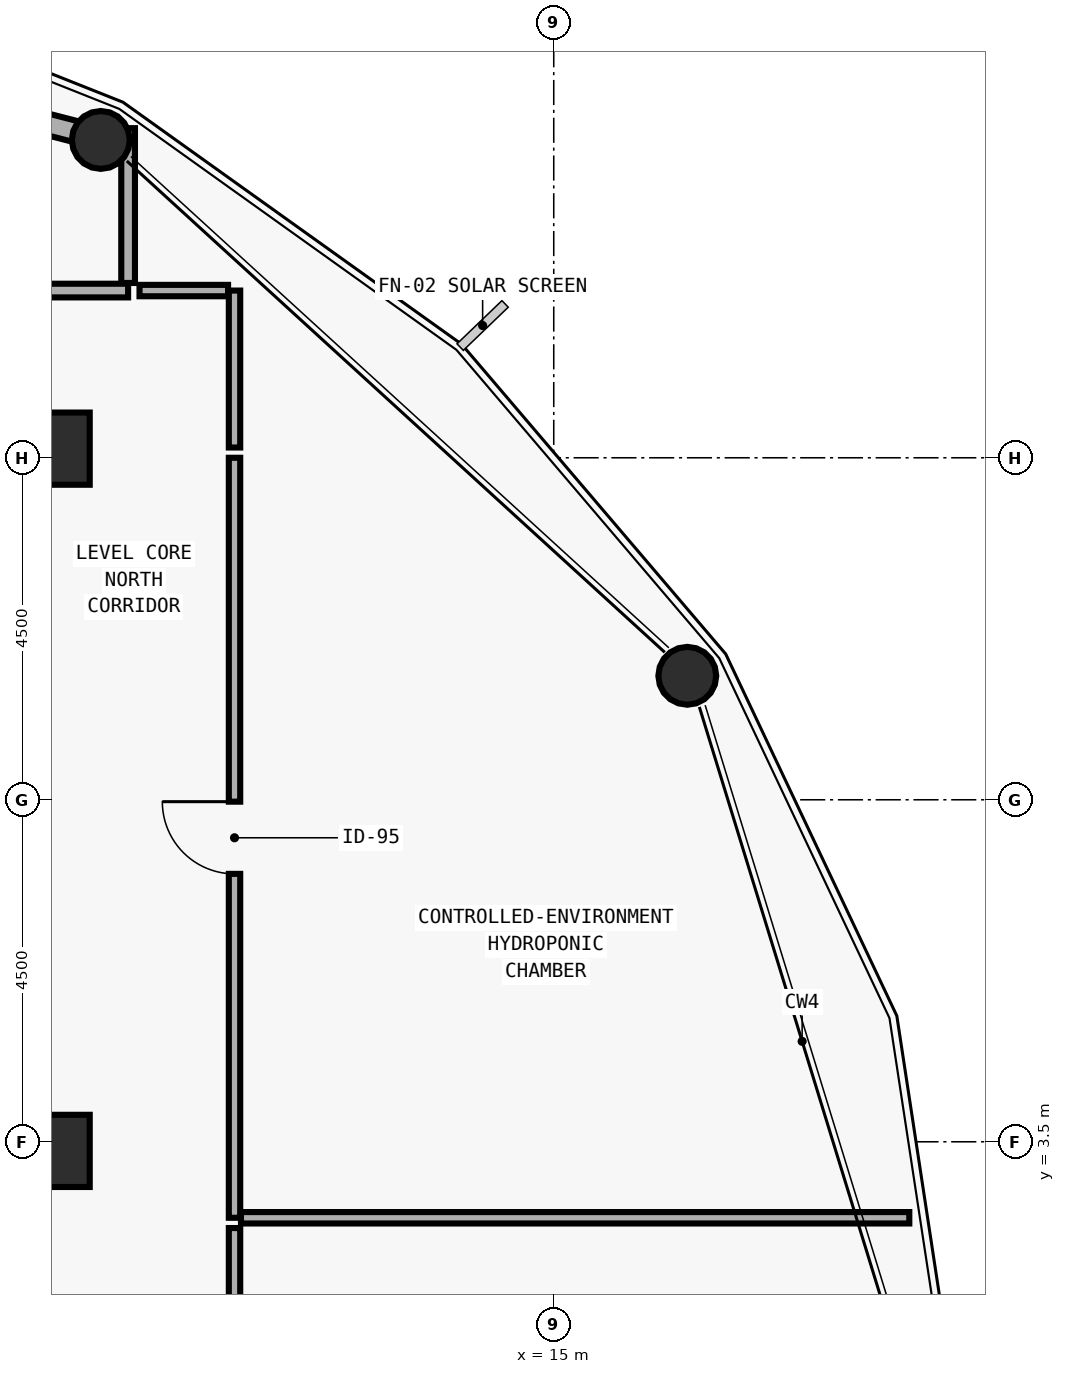
"""IFC4 building model, lengths in metres.
Left out: names, types, materials, properties, quantities, classifications, styles, units other than length and angle.
Written with IfcOpenShell. Run it as: python <this file> out.ifc"""

import sys

from ifc_helpers import new_model, si_unit, direction, frame, frame_2d, origin, origin_2d, place, context, subcontext, project, spatial, rectangle, hollow_circle, extrude, element, fill, save


model = new_model("IFC4")
c1 = context("Model", 3, precision=1e-05, world=origin(), true_north=direction((0.0, 1.0)))
c2 = subcontext(c1, "Body", "Model", "MODEL_VIEW")
j1 = project(units=[si_unit("LENGTHUNIT", "METRE"), si_unit("PLANEANGLEUNIT", "RADIAN")], contexts=[c1])
p1 = place(None, origin())
s1 = spatial("IfcSite", under=j1, at=p1, CompositionType="ELEMENT")
p2 = place(p1, origin())
s2 = spatial("IfcBuilding", under=s1, at=p2, CompositionType="ELEMENT")
p3 = place(p2, frame((0.0, 0.0, 122.7)))
s3 = spatial("IfcBuildingStorey", under=s2, at=p3, CompositionType="ELEMENT", Elevation=122.7)
for number, where, z_axis, x_axis in (
    (1, (8.42, 12.62, 0.0), (0.0, 0.0, 1.0), (1.0, 0.0, 0.0)),
    (2, (8.42, 3.38, 0.0), (0.0, 0.0, 1.0), (1.0, 0.0, 0.0)),
):
    element("IfcColumn", number, at=place(p3, frame(where, z_axis=z_axis, x_axis=x_axis)), inside=s3, PredefinedType="COLUMN", context=c2, shape_type="SweptSolid", body=[
        extrude(rectangle(XDim=0.95, YDim=0.95, at=origin_2d()), origin(), (0.0, 0.0, 1.0), 3.875),
    ])
p4 = place(p3, frame((16.786, 9.643, 0.0), z_axis=(-0.01499299424, -0.00611059009, 0.999868926816), x_axis=(0.377420478288, -0.926041998275, 0.0)))
e3 = element("IfcColumn", 3, at=p4, inside=s3, PredefinedType="COLUMN", context=c2, shape_type="SweptSolid", body=[
    extrude(hollow_circle(Radius=0.381, WallThickness=0.028, at=origin_2d()), origin(), (0.0, 0.0, 1.0), 3.875),
])
p5 = place(p3, frame((9.058, 16.702, 0.0), z_axis=(-0.008693752408, -0.010457702172, 0.999907523291), x_axis=(0.768980150656, -0.639272655365, 0.0)))
e4 = element("IfcColumn", 4, at=p5, inside=s3, PredefinedType="COLUMN", context=c2, shape_type="SweptSolid", body=[
    extrude(hollow_circle(Radius=0.381, WallThickness=0.028, at=origin_2d()), origin(), (0.0, 0.0, 1.0), 3.875),
])
p6 = place(p3, frame((-1.175, 19.337, 0.0), z_axis=(0.0, 0.0, 1.0), x_axis=(0.968402744181, -0.249391509604, 0.0)))
e5 = element("IfcWall", 5, at=p6, inside=s3, PredefinedType="SOLIDWALL", context=c2, shape_type="SweptSolid", body=[
    extrude(rectangle(XDim=10.23, YDim=0.28, at=frame_2d((5.115, 0.0))), origin(), (0.0, 0.0, 1.0), 3.16),
])
p7 = place(p3, frame((10.8, 2.5, 0.0), z_axis=(0.0, 0.0, 1.0), x_axis=(0.0, 1.0, 0.0)))
e6 = element("IfcWall", 6, at=p7, inside=s3, PredefinedType="PARTITIONING", context=c2, shape_type="SweptSolid", body=[
    extrude(rectangle(XDim=10.0, YDim=0.15, at=frame_2d((5.0, 0.0))), origin(), (0.0, 0.0, 1.0), 3.64),
])
p8 = place(p7, frame((4.525, 0.0, 0.0)))
e7 = element("IfcOpeningElement", 7, at=p8, cuts=e6, PredefinedType="OPENING", context=c2, shape_type="SweptSolid", body=[
    extrude(rectangle(XDim=0.95, YDim=2.1, at=frame_2d((0.475, 1.05))), frame((0.0, 0.085, 0.0), z_axis=(0.0, -1.0, 0.0), x_axis=(1.0, 0.0, 0.0)), (0.0, 0.0, 1.0), 0.17),
])
p9 = place(p3, frame((9.4, 14.7, 0.0), z_axis=(0.0, 0.0, 1.0), x_axis=(-1.0, 0.0, 0.0)))
e8 = element("IfcWall", 8, at=p9, inside=s3, PredefinedType="PLUMBINGWALL", context=c2, shape_type="SweptSolid", body=[
    extrude(rectangle(XDim=1.25, YDim=0.18, at=frame_2d((0.625, 0.0))), origin(), (0.0, 0.0, 1.0), 3.222),
])
p10 = place(p3, frame((10.8, -1.69, 0.0), z_axis=(0.0, 0.0, 1.0), x_axis=(0.0, 1.0, 0.0)))
e9 = element("IfcWall", 9, at=p10, inside=s3, PredefinedType="PARTITIONING", context=c2, shape_type="SweptSolid", body=[
    extrude(rectangle(XDim=4.055, YDim=0.15, at=frame_2d((2.027, 0.0))), origin(), (0.0, 0.0, 1.0), 3.64),
])
p11 = place(p3, frame((10.885, 2.5, 0.0), z_axis=(0.0, 0.0, 1.0), x_axis=(1.0, 0.0, 0.0)))
e10 = element("IfcWall", 10, at=p11, inside=s3, PredefinedType="PARTITIONING", context=c2, shape_type="SweptSolid", body=[
    extrude(rectangle(XDim=8.793, YDim=0.15, at=frame_2d((4.396, 0.0))), origin(), (0.0, 0.0, 1.0), 3.64),
])
p12 = place(p3, frame((10.8, 12.635, 0.0), z_axis=(0.0, 0.0, 1.0), x_axis=(0.0, 1.0, 0.0)))
e11 = element("IfcWall", 11, at=p12, inside=s3, PredefinedType="PARTITIONING", context=c2, shape_type="SweptSolid", body=[
    extrude(rectangle(XDim=2.065, YDim=0.15, at=frame_2d((1.032, 0.0))), origin(), (0.0, 0.0, 1.0), 3.64),
])
p13 = place(p3, frame((10.715, 14.7, 0.0), z_axis=(0.0, 0.0, 1.0), x_axis=(-1.0, 0.0, 0.0)))
e12 = element("IfcWall", 12, at=p13, inside=s3, PredefinedType="PARTITIONING", context=c2, shape_type="SweptSolid", body=[
    extrude(rectangle(XDim=1.165, YDim=0.15, at=frame_2d((0.583, 0.0))), origin(), (0.0, 0.0, 1.0), 3.64),
])
p14 = place(p3, frame((9.4, 14.8, 0.0), z_axis=(0.0, 0.0, 1.0), x_axis=(0.0, 1.0, 0.0)))
e13 = element("IfcWall", 13, at=p14, inside=s3, PredefinedType="PLUMBINGWALL", context=c2, shape_type="SweptSolid", body=[
    extrude(rectangle(XDim=2.037, YDim=0.18, at=frame_2d((1.019, 0.0))), origin(), (0.0, 0.0, 1.0), 3.072),
])
p15 = place(p8, origin())
e14 = element("IfcDoor", 14, at=p15, inside=s3, OperationType="SINGLE_SWING_RIGHT", PredefinedType="DOOR", context=c2, shape_type="SweptSolid", body=[
    extrude(rectangle(XDim=0.95, YDim=2.1, at=frame_2d((0.475, 1.05))), frame((0.0, 0.025, 0.0), z_axis=(0.0, -1.0, 0.0), x_axis=(1.0, 0.0, 0.0)), (0.0, 0.0, 1.0), 0.05),
])
fill(e7, e14)
save(model, sys.argv[1])
